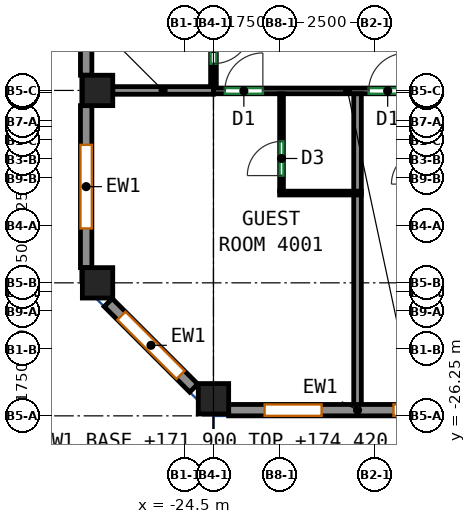
"""IFC4 building model, lengths in metres.
Left out: names, types, materials, properties, quantities, classifications, styles, units other than length and angle.
Written with IfcOpenShell. Run it as: python <this file> out.ifc"""

import sys

from ifc_helpers import new_model, si_unit, direction, frame, frame_2d, origin, origin_2d, place, context, subcontext, project, spatial, rectangle, extrude, source, transform, mapped, element, fill, save


model = new_model("IFC4")
c1 = context("Model", 3, precision=1e-05, world=origin(), true_north=direction((0.0, 1.0)))
c2 = subcontext(c1, "Body", "Model", "MODEL_VIEW")
j1 = project(units=[si_unit("LENGTHUNIT", "METRE"), si_unit("PLANEANGLEUNIT", "RADIAN")], contexts=[c1])
p1 = place(None, origin())
s1 = spatial("IfcSite", under=j1, at=p1, CompositionType="ELEMENT")
p2 = place(p1, origin())
s2 = spatial("IfcBuilding", under=s1, at=p2, CompositionType="ELEMENT")
p3 = place(p2, frame((0.0, 0.0, 171.9)))
s3 = spatial("IfcBuildingStorey", under=s2, at=p3, CompositionType="ELEMENT", Elevation=171.9)
m1 = source(origin(), c2, "Body", "SweptSolid", [
    extrude(rectangle(XDim=0.8, YDim=0.8, at=origin_2d()), origin(), (0.0, 0.0, 1.0), 3.12),
])
for number, where, z_axis, x_axis in (
    (1, (-26.8, -22.75, 0.0), (0.0, 0.0, 1.0), (1.0, 0.0, 0.0)),
    (2, (-26.8, -17.688, 0.0), (0.0, 0.0, 1.0), (1.0, 0.0, 0.0)),
    (3, (-23.75, -25.8, 0.0), (0.0, 0.0, 1.0), (1.0, 0.0, 0.0)),
):
    element("IfcColumn", number, at=place(p3, frame(where, z_axis=z_axis, x_axis=x_axis)), inside=s3, PredefinedType="COLUMN", context=c2, shape_type="MappedRepresentation", body=[
        mapped(m1, transform((0.0, 0.0, 0.0))),
    ])
m2 = source(origin(), c2, "Body", "SweptSolid", [
    extrude(rectangle(XDim=6.783, YDim=0.3, at=frame_2d((3.392, 0.0))), origin(), (0.0, 0.0, 1.0), 3.12),
])
p4 = place(p3, frame((-23.35, -26.1, 0.0), z_axis=(0.0, 0.0, 1.0), x_axis=(1.0, 0.0, 0.0)))
e4 = element("IfcWall", 4, at=p4, inside=s3, PredefinedType="SOLIDWALL", context=c2, shape_type="MappedRepresentation", body=[
    mapped(m2, transform((0.0, 0.0, 0.0))),
])
p5 = place(p4, frame((0.946, 0.0, 0.85)))
e5 = element("IfcOpeningElement", 5, at=p5, cuts=e4, PredefinedType="OPENING", context=c2, shape_type="SweptSolid", body=[
    extrude(rectangle(XDim=1.5, YDim=1.95, at=frame_2d((0.75, 0.975))), frame((0.0, 0.16, 0.0), z_axis=(0.0, -1.0, 0.0), x_axis=(1.0, 0.0, 0.0)), (0.0, 0.0, 1.0), 0.32),
])
p6 = place(p4, frame((4.337, 0.0, 0.85)))
e6 = element("IfcOpeningElement", 6, at=p6, cuts=e4, PredefinedType="OPENING", context=c2, shape_type="SweptSolid", body=[
    extrude(rectangle(XDim=1.5, YDim=1.95, at=frame_2d((0.75, 0.975))), frame((0.0, 0.16, 0.0), z_axis=(0.0, -1.0, 0.0), x_axis=(1.0, 0.0, 0.0)), (0.0, 0.0, 1.0), 0.32),
])
m3 = source(origin(), c2, "Body", "SweptSolid", [
    extrude(rectangle(XDim=7.763, YDim=0.3, at=frame_2d((3.881, 0.0))), origin(), (0.0, 0.0, 1.0), 3.12),
])
p7 = place(p3, frame((-27.1, -9.525, 0.0), z_axis=(0.0, 0.0, 1.0), x_axis=(0.0, -1.0, 0.0)))
e7 = element("IfcWall", 7, at=p7, inside=s3, PredefinedType="SOLIDWALL", context=c2, shape_type="MappedRepresentation", body=[
    mapped(m3, transform((0.0, 0.0, 0.0))),
])
p8 = place(p7, frame((0.841, 0.0, 0.85)))
e8 = element("IfcOpeningElement", 8, at=p8, cuts=e7, PredefinedType="OPENING", context=c2, shape_type="SweptSolid", body=[
    extrude(rectangle(XDim=2.2, YDim=1.95, at=frame_2d((1.1, 0.975))), frame((0.0, 0.16, 0.0), z_axis=(0.0, -1.0, 0.0), x_axis=(1.0, 0.0, 0.0)), (0.0, 0.0, 1.0), 0.32),
])
p9 = place(p7, frame((4.722, 0.0, 0.85)))
e9 = element("IfcOpeningElement", 9, at=p9, cuts=e7, PredefinedType="OPENING", context=c2, shape_type="SweptSolid", body=[
    extrude(rectangle(XDim=2.2, YDim=1.95, at=frame_2d((1.1, 0.975))), frame((0.0, 0.16, 0.0), z_axis=(0.0, -1.0, 0.0), x_axis=(1.0, 0.0, 0.0)), (0.0, 0.0, 1.0), 0.32),
])
m4 = source(origin(), c2, "Body", "SweptSolid", [
    extrude(rectangle(XDim=4.263, YDim=0.3, at=frame_2d((2.131, 0.0))), origin(), (0.0, 0.0, 1.0), 3.12),
])
p10 = place(p3, frame((-27.1, -18.087, 0.0), z_axis=(0.0, 0.0, 1.0), x_axis=(0.0, -1.0, 0.0)))
e10 = element("IfcWall", 10, at=p10, inside=s3, PredefinedType="SOLIDWALL", context=c2, shape_type="MappedRepresentation", body=[
    mapped(m4, transform((0.0, 0.0, 0.0))),
])
p11 = place(p10, frame((1.031, 0.0, 0.85)))
e11 = element("IfcOpeningElement", 11, at=p11, cuts=e10, PredefinedType="OPENING", context=c2, shape_type="SweptSolid", body=[
    extrude(rectangle(XDim=2.2, YDim=1.95, at=frame_2d((1.1, 0.975))), frame((0.0, 0.16, 0.0), z_axis=(0.0, -1.0, 0.0), x_axis=(1.0, 0.0, 0.0)), (0.0, 0.0, 1.0), 0.32),
])
m5 = source(origin(), c2, "Body", "SweptSolid", [
    extrude(rectangle(XDim=3.182, YDim=0.3, at=frame_2d((1.591, 0.0))), origin(), (0.0, 0.0, 1.0), 3.12),
])
p12 = place(p3, frame((-26.519, -23.269, 0.0), z_axis=(0.0, 0.0, 1.0), x_axis=(0.707068419229, -0.707145141063, 0.0)))
e12 = element("IfcWall", 12, at=p12, inside=s3, PredefinedType="SOLIDWALL", context=c2, shape_type="MappedRepresentation", body=[
    mapped(m5, transform((0.0, 0.0, 0.0))),
])
p13 = place(p12, frame((0.491, 0.0, 0.85)))
e13 = element("IfcOpeningElement", 13, at=p13, cuts=e12, PredefinedType="OPENING", context=c2, shape_type="SweptSolid", body=[
    extrude(rectangle(XDim=2.2, YDim=1.95, at=frame_2d((1.1, 0.975))), frame((0.0, 0.16, 0.0), z_axis=(0.0, -1.0, 0.0), x_axis=(1.0, 0.0, 0.0)), (0.0, 0.0, 1.0), 0.32),
])
p14 = place(p3, frame((-23.75, -17.7, 0.0), z_axis=(0.0, 0.0, 1.0), x_axis=(1.0, 0.0, 0.0)))
e14 = element("IfcWall", 14, at=p14, inside=s3, PredefinedType="PARTITIONING", context=c2, shape_type="SweptSolid", body=[
    extrude(rectangle(XDim=7.058, YDim=0.15, at=frame_2d((3.529, 0.0))), origin(), (0.0, 0.0, 1.0), 2.52),
])
p15 = place(p14, frame((0.3, 0.0, 0.0)))
e15 = element("IfcOpeningElement", 15, at=p15, cuts=e14, PredefinedType="OPENING", context=c2, shape_type="SweptSolid", body=[
    extrude(rectangle(XDim=1.0, YDim=2.1, at=frame_2d((0.5, 1.05))), frame((0.0, 0.085, 0.0), z_axis=(0.0, -1.0, 0.0), x_axis=(1.0, 0.0, 0.0)), (0.0, 0.0, 1.0), 0.17),
])
p16 = place(p14, frame((4.084, 0.0, 0.0)))
e16 = element("IfcOpeningElement", 16, at=p16, cuts=e14, PredefinedType="OPENING", context=c2, shape_type="SweptSolid", body=[
    extrude(rectangle(XDim=1.0, YDim=2.1, at=frame_2d((0.5, 1.05))), frame((0.0, 0.085, 0.0), z_axis=(0.0, -1.0, 0.0), x_axis=(1.0, 0.0, 0.0)), (0.0, 0.0, 1.0), 0.17),
])
p17 = place(p3, frame((-23.75, -15.575, 0.0), z_axis=(0.0, 0.0, 1.0), x_axis=(0.0, -1.0, 0.0)))
e17 = element("IfcWall", 17, at=p17, inside=s3, PredefinedType="PARTITIONING", context=c2, shape_type="SweptSolid", body=[
    extrude(rectangle(XDim=2.023, YDim=0.15, at=frame_2d((1.011, 0.0))), origin(), (0.0, 0.0, 1.0), 2.52),
])
p18 = place(p17, frame((0.408, 0.0, 0.0)))
e18 = element("IfcOpeningElement", 18, at=p18, cuts=e17, PredefinedType="OPENING", context=c2, shape_type="SweptSolid", body=[
    extrude(rectangle(XDim=1.0, YDim=2.1, at=frame_2d((0.5, 1.05))), frame((0.0, 0.085, 0.0), z_axis=(0.0, -1.0, 0.0), x_axis=(1.0, 0.0, 0.0)), (0.0, 0.0, 1.0), 0.17),
])
p19 = place(p3, frame((-21.959, -20.338, 0.0), z_axis=(0.0, 0.0, 1.0), x_axis=(0.0, 1.0, 0.0)))
e19 = element("IfcWall", 19, at=p19, inside=s3, PredefinedType="PARTITIONING", context=c2, shape_type="SweptSolid", body=[
    extrude(rectangle(XDim=2.561, YDim=0.1, at=frame_2d((1.28, 0.0))), origin(), (0.0, 0.0, 1.0), 3.12),
])
p20 = place(p19, frame((0.41, 0.0, 0.0)))
e20 = element("IfcOpeningElement", 20, at=p20, cuts=e19, PredefinedType="OPENING", context=c2, shape_type="SweptSolid", body=[
    extrude(rectangle(XDim=0.9, YDim=2.1, at=frame_2d((0.45, 1.05))), frame((0.0, 0.06, 0.0), z_axis=(0.0, -1.0, 0.0), x_axis=(1.0, 0.0, 0.0)), (0.0, 0.0, 1.0), 0.12),
])
p21 = place(p3, frame((-22.009, -20.388, 0.0), z_axis=(0.0, 0.0, 1.0), x_axis=(1.0, 0.0, 0.0)))
e21 = element("IfcWall", 21, at=p21, inside=s3, PredefinedType="PARTITIONING", context=c2, shape_type="SweptSolid", body=[
    extrude(rectangle(XDim=2.15, YDim=0.1, at=frame_2d((1.075, 0.0))), origin(), (0.0, 0.0, 1.0), 3.12),
])
p22 = place(p3, frame((-19.959, -26.0, 0.0), z_axis=(0.0, 0.0, 1.0), x_axis=(0.0, 1.0, 0.0)))
e22 = element("IfcWall", 22, at=p22, inside=s3, PredefinedType="PARTITIONING", context=c2, shape_type="SweptSolid", body=[
    extrude(rectangle(XDim=5.562, YDim=0.2, at=frame_2d((2.781, 0.0))), origin(), (0.0, 0.0, 1.0), 3.12),
])
p23 = place(p3, frame((-26.4, -17.688, 0.0), z_axis=(0.0, 0.0, 1.0), x_axis=(1.0, 0.0, 0.0)))
e23 = element("IfcWall", 23, at=p23, inside=s3, PredefinedType="PARTITIONING", context=c2, shape_type="SweptSolid", body=[
    extrude(rectangle(XDim=2.648, YDim=0.2, at=frame_2d((1.324, 0.0))), origin(), (0.0, 0.0, 1.0), 2.52),
])
p24 = place(p3, frame((-19.959, -20.338, 0.0), z_axis=(0.0, 0.0, 1.0), x_axis=(0.0, 1.0, 0.0)))
e24 = element("IfcWall", 24, at=p24, inside=s3, PredefinedType="PARTITIONING", context=c2, shape_type="SweptSolid", body=[
    extrude(rectangle(XDim=2.561, YDim=0.2, at=frame_2d((1.28, 0.0))), origin(), (0.0, 0.0, 1.0), 3.12),
])
p25 = place(p5, origin())
e25 = element("IfcWindow", 25, at=p25, inside=s3, PartitioningType="SINGLE_PANEL", PredefinedType="WINDOW", context=c2, shape_type="SweptSolid", body=[
    extrude(rectangle(XDim=1.5, YDim=1.95, at=frame_2d((0.75, 0.975))), frame((0.0, 0.03, 0.0), z_axis=(0.0, -1.0, 0.0), x_axis=(1.0, 0.0, 0.0)), (0.0, 0.0, 1.0), 0.06),
])
fill(e5, e25)
p26 = place(p6, origin())
e26 = element("IfcWindow", 26, at=p26, inside=s3, PartitioningType="SINGLE_PANEL", PredefinedType="WINDOW", context=c2, shape_type="SweptSolid", body=[
    extrude(rectangle(XDim=1.5, YDim=1.95, at=frame_2d((0.75, 0.975))), frame((0.0, 0.03, 0.0), z_axis=(0.0, -1.0, 0.0), x_axis=(1.0, 0.0, 0.0)), (0.0, 0.0, 1.0), 0.06),
])
fill(e6, e26)
p27 = place(p11, origin())
e27 = element("IfcWindow", 27, at=p27, inside=s3, PartitioningType="SINGLE_PANEL", PredefinedType="WINDOW", context=c2, shape_type="SweptSolid", body=[
    extrude(rectangle(XDim=2.2, YDim=1.95, at=frame_2d((1.1, 0.975))), frame((0.0, 0.03, 0.0), z_axis=(0.0, -1.0, 0.0), x_axis=(1.0, 0.0, 0.0)), (0.0, 0.0, 1.0), 0.06),
])
fill(e11, e27)
p28 = place(p13, origin())
e28 = element("IfcWindow", 28, at=p28, inside=s3, PartitioningType="SINGLE_PANEL", PredefinedType="WINDOW", context=c2, shape_type="SweptSolid", body=[
    extrude(rectangle(XDim=2.2, YDim=1.95, at=frame_2d((1.1, 0.975))), frame((0.0, 0.03, 0.0), z_axis=(0.0, -1.0, 0.0), x_axis=(1.0, 0.0, 0.0)), (0.0, 0.0, 1.0), 0.06),
])
fill(e13, e28)
p29 = place(p20, origin())
e29 = element("IfcDoor", 29, at=p29, inside=s3, OperationType="SINGLE_SWING_LEFT", PredefinedType="DOOR", context=c2, shape_type="SweptSolid", body=[
    extrude(rectangle(XDim=0.9, YDim=2.1, at=frame_2d((0.45, 1.05))), frame((0.0, 0.025, 0.0), z_axis=(0.0, -1.0, 0.0), x_axis=(1.0, 0.0, 0.0)), (0.0, 0.0, 1.0), 0.05),
])
fill(e20, e29)
p30 = place(p15, origin())
e30 = element("IfcDoor", 30, at=p30, inside=s3, OperationType="SINGLE_SWING_RIGHT", PredefinedType="DOOR", context=c2, shape_type="SweptSolid", body=[
    extrude(rectangle(XDim=1.0, YDim=2.1, at=frame_2d((0.5, 1.05))), frame((0.0, 0.025, 0.0), z_axis=(0.0, -1.0, 0.0), x_axis=(1.0, 0.0, 0.0)), (0.0, 0.0, 1.0), 0.05),
])
fill(e15, e30)
p31 = place(p16, origin())
e31 = element("IfcDoor", 31, at=p31, inside=s3, OperationType="SINGLE_SWING_RIGHT", PredefinedType="DOOR", context=c2, shape_type="SweptSolid", body=[
    extrude(rectangle(XDim=1.0, YDim=2.1, at=frame_2d((0.5, 1.05))), frame((0.0, 0.025, 0.0), z_axis=(0.0, -1.0, 0.0), x_axis=(1.0, 0.0, 0.0)), (0.0, 0.0, 1.0), 0.05),
])
fill(e16, e31)
p32 = place(p18, origin())
e32 = element("IfcDoor", 32, at=p32, inside=s3, OperationType="SINGLE_SWING_LEFT", PredefinedType="DOOR", context=c2, shape_type="SweptSolid", body=[
    extrude(rectangle(XDim=1.0, YDim=2.1, at=frame_2d((0.5, 1.05))), frame((0.0, 0.025, 0.0), z_axis=(0.0, -1.0, 0.0), x_axis=(1.0, 0.0, 0.0)), (0.0, 0.0, 1.0), 0.05),
])
fill(e18, e32)
save(model, sys.argv[1])
